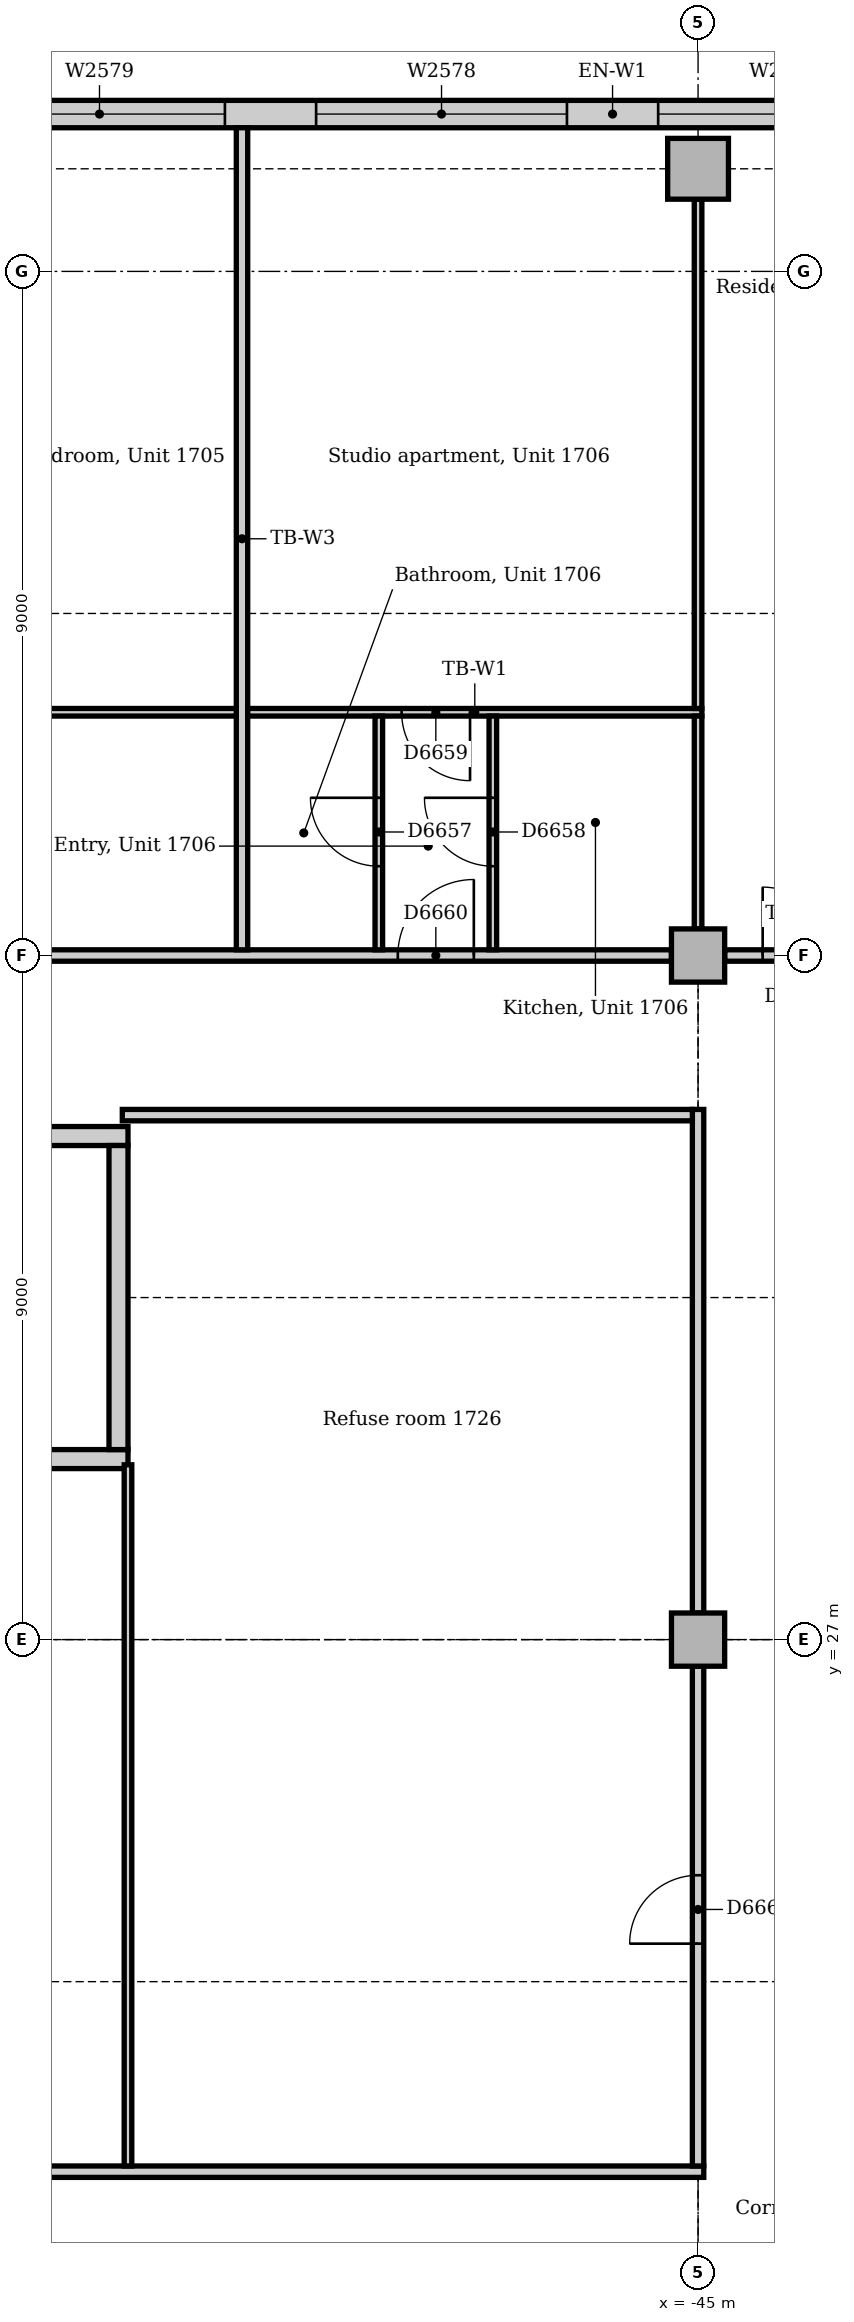
"""IFC4 building model, lengths in metres.
Left out: names, types, materials, properties, quantities, classifications, styles, units other than length and angle.
Written with IfcOpenShell. Run it as: python <this file> out.ifc"""

import sys

from ifc_helpers import new_model, si_unit, direction, frame, frame_2d, origin, origin_2d, place, context, subcontext, project, spatial, rectangle, extrude, element, fill, save


model = new_model("IFC4")
c1 = context("Model", 3, precision=1e-05, world=origin(), true_north=direction((0.0, 1.0)))
c2 = subcontext(c1, "Body", "Model", "MODEL_VIEW")
j1 = project(units=[si_unit("LENGTHUNIT", "METRE"), si_unit("PLANEANGLEUNIT", "RADIAN")], contexts=[c1])
p1 = place(None, origin())
s1 = spatial("IfcSite", under=j1, at=p1, CompositionType="ELEMENT")
p2 = place(p1, origin())
s2 = spatial("IfcBuilding", under=s1, at=p2, CompositionType="ELEMENT")
p3 = place(p2, frame((0.0, 0.0, 75.0)))
s3 = spatial("IfcBuildingStorey", under=s2, at=p3, CompositionType="ELEMENT", Elevation=75.0)
p4 = place(p3, frame((-60.0, 29.375, 0.0), z_axis=(0.0, 0.0, 1.0), x_axis=(1.0, 0.0, 0.0)))
e1 = element("IfcWall", 1, at=p4, inside=s3, PredefinedType="SOLIDWALL", context=c2, shape_type="SweptSolid", body=[
    extrude(rectangle(XDim=7.5, YDim=0.25, at=frame_2d((3.75, 0.0))), origin(), (0.0, 0.0, 1.0), 4.0),
])
p5 = place(p3, frame((-52.5, 33.625, 0.0), z_axis=(0.0, 0.0, 1.0), x_axis=(-1.0, 0.0, 0.0)))
e2 = element("IfcWall", 2, at=p5, inside=s3, PredefinedType="SOLIDWALL", context=c2, shape_type="SweptSolid", body=[
    extrude(rectangle(XDim=7.5, YDim=0.25, at=frame_2d((3.75, 0.0))), origin(), (0.0, 0.0, 1.0), 4.0),
])
p6 = place(p5, frame((6.0, 0.0, 0.0)))
e3 = element("IfcOpeningElement", 3, at=p6, cuts=e2, PredefinedType="OPENING", context=c2, shape_type="SweptSolid", body=[
    extrude(rectangle(XDim=1.0, YDim=2.1, at=frame_2d((0.5, 1.05))), frame((0.0, 0.135, 0.0), z_axis=(0.0, -1.0, 0.0), x_axis=(1.0, 0.0, 0.0)), (0.0, 0.0, 1.0), 0.27),
])
p7 = place(p3, frame((-52.625, 29.5, 0.0), z_axis=(0.0, 0.0, 1.0), x_axis=(0.0, 1.0, 0.0)))
e4 = element("IfcWall", 4, at=p7, inside=s3, PredefinedType="SOLIDWALL", context=c2, shape_type="SweptSolid", body=[
    extrude(rectangle(XDim=4.0, YDim=0.25, at=frame_2d((2.0, 0.0))), origin(), (0.0, 0.0, 1.0), 4.0),
])
p8 = place(p3, frame((-45.0, 46.35, 0.0), z_axis=(0.0, 0.0, 1.0), x_axis=(1.0, 0.0, 0.0)))
e5 = element("IfcColumn", 5, at=p8, inside=s3, PredefinedType="COLUMN", context=c2, shape_type="SweptSolid", body=[
    extrude(rectangle(XDim=0.8, YDim=0.8, at=origin_2d()), origin(), (0.0, 0.0, 1.0), 3.85),
])
for number, where, z_axis, x_axis in (
    (6, (-45.0, 27.0, 0.0), (0.0, 0.0, 1.0), (1.0, 0.0, 0.0)),
    (7, (-45.0, 36.0, 0.0), (0.0, 0.0, 1.0), (1.0, 0.0, 0.0)),
):
    element("IfcColumn", number, at=place(p3, frame(where, z_axis=z_axis, x_axis=x_axis)), inside=s3, PredefinedType="COLUMN", context=c2, shape_type="SweptSolid", body=[
        extrude(rectangle(XDim=0.7, YDim=0.7, at=origin_2d()), origin(), (0.0, 0.0, 1.0), 3.85),
    ])
p9 = place(p3, frame((-31.243, 47.07, 0.0), z_axis=(0.0, 0.0, 1.0), x_axis=(-1.0, 0.0, 0.0)))
e8 = element("IfcWall", 8, at=p9, inside=s3, PredefinedType="STANDARD", context=c2, shape_type="SweptSolid", body=[
    extrude(rectangle(XDim=29.765, YDim=0.36, at=frame_2d((14.882, 0.0))), origin(), (0.0, 0.0, 1.0), 3.85),
])
p10 = place(p9, frame((1.982, 0.0, 0.9)))
e9 = element("IfcOpeningElement", 9, at=p10, cuts=e8, PredefinedType="OPENING", context=c2, shape_type="SweptSolid", body=[
    extrude(rectangle(XDim=3.3, YDim=1.6, at=frame_2d((1.65, 0.8))), frame((0.0, 0.19, 0.0), z_axis=(0.0, -1.0, 0.0), x_axis=(1.0, 0.0, 0.0)), (0.0, 0.0, 1.0), 0.38),
])
p11 = place(p9, frame((6.482, 0.0, 0.9)))
e10 = element("IfcOpeningElement", 10, at=p11, cuts=e8, PredefinedType="OPENING", context=c2, shape_type="SweptSolid", body=[
    extrude(rectangle(XDim=3.3, YDim=1.6, at=frame_2d((1.65, 0.8))), frame((0.0, 0.19, 0.0), z_axis=(0.0, -1.0, 0.0), x_axis=(1.0, 0.0, 0.0)), (0.0, 0.0, 1.0), 0.38),
])
p12 = place(p9, frame((10.982, 0.0, 0.9)))
e11 = element("IfcOpeningElement", 11, at=p12, cuts=e8, PredefinedType="OPENING", context=c2, shape_type="SweptSolid", body=[
    extrude(rectangle(XDim=3.3, YDim=1.6, at=frame_2d((1.65, 0.8))), frame((0.0, 0.19, 0.0), z_axis=(0.0, -1.0, 0.0), x_axis=(1.0, 0.0, 0.0)), (0.0, 0.0, 1.0), 0.38),
])
p13 = place(p9, frame((15.482, 0.0, 0.9)))
e12 = element("IfcOpeningElement", 12, at=p13, cuts=e8, PredefinedType="OPENING", context=c2, shape_type="SweptSolid", body=[
    extrude(rectangle(XDim=3.3, YDim=1.6, at=frame_2d((1.65, 0.8))), frame((0.0, 0.19, 0.0), z_axis=(0.0, -1.0, 0.0), x_axis=(1.0, 0.0, 0.0)), (0.0, 0.0, 1.0), 0.38),
])
p14 = place(p9, frame((19.982, 0.0, 0.9)))
e13 = element("IfcOpeningElement", 13, at=p14, cuts=e8, PredefinedType="OPENING", context=c2, shape_type="SweptSolid", body=[
    extrude(rectangle(XDim=3.3, YDim=1.6, at=frame_2d((1.65, 0.8))), frame((0.0, 0.19, 0.0), z_axis=(0.0, -1.0, 0.0), x_axis=(1.0, 0.0, 0.0)), (0.0, 0.0, 1.0), 0.38),
])
p15 = place(p9, frame((24.482, 0.0, 0.9)))
e14 = element("IfcOpeningElement", 14, at=p15, cuts=e8, PredefinedType="OPENING", context=c2, shape_type="SweptSolid", body=[
    extrude(rectangle(XDim=3.3, YDim=1.6, at=frame_2d((1.65, 0.8))), frame((0.0, 0.19, 0.0), z_axis=(0.0, -1.0, 0.0), x_axis=(1.0, 0.0, 0.0)), (0.0, 0.0, 1.0), 0.38),
])
p16 = place(p3, frame((-44.65, 36.0, 0.0), z_axis=(0.0, 0.0, 1.0), x_axis=(1.0, 0.0, 0.0)))
e15 = element("IfcWall", 15, at=p16, inside=s3, PredefinedType="PARTITIONING", context=c2, shape_type="SweptSolid", body=[
    extrude(rectangle(XDim=1.925, YDim=0.15, at=frame_2d((0.963, 0.0))), origin(), (0.0, 0.0, 1.0), 3.602),
])
p17 = place(p16, frame((0.5, 0.0, 0.0)))
e16 = element("IfcOpeningElement", 16, at=p17, cuts=e15, PredefinedType="OPENING", context=c2, shape_type="SweptSolid", body=[
    extrude(rectangle(XDim=0.9, YDim=2.1, at=frame_2d((0.45, 1.05))), frame((0.0, 0.085, 0.0), z_axis=(0.0, -1.0, 0.0), x_axis=(1.0, 0.0, 0.0)), (0.0, 0.0, 1.0), 0.17),
])
p18 = place(p3, frame((-53.65, 36.0, 0.0), z_axis=(0.0, 0.0, 1.0), x_axis=(1.0, 0.0, 0.0)))
e17 = element("IfcWall", 17, at=p18, inside=s3, PredefinedType="PARTITIONING", context=c2, shape_type="SweptSolid", body=[
    extrude(rectangle(XDim=8.3, YDim=0.15, at=frame_2d((4.15, 0.0))), origin(), (0.0, 0.0, 1.0), 3.158),
])
p19 = place(p18, frame((4.7, 0.0, 0.0)))
e18 = element("IfcOpeningElement", 18, at=p19, cuts=e17, PredefinedType="OPENING", context=c2, shape_type="SweptSolid", body=[
    extrude(rectangle(XDim=1.0, YDim=2.1, at=frame_2d((0.5, 1.05))), frame((0.0, 0.085, 0.0), z_axis=(0.0, -1.0, 0.0), x_axis=(1.0, 0.0, 0.0)), (0.0, 0.0, 1.0), 0.17),
])
p20 = place(p3, frame((-64.89, 20.0, 0.0), z_axis=(0.0, 0.0, 1.0), x_axis=(1.0, 0.0, 0.0)))
e19 = element("IfcWall", 19, at=p20, inside=s3, PredefinedType="PARTITIONING", context=c2, shape_type="SweptSolid", body=[
    extrude(rectangle(XDim=19.965, YDim=0.15, at=frame_2d((9.982, 0.0))), origin(), (0.0, 0.0, 1.0), 3.85),
])
p21 = place(p20, frame((2.05, 0.0, 0.0)))
e20 = element("IfcOpeningElement", 20, at=p21, cuts=e19, PredefinedType="OPENING", context=c2, shape_type="SweptSolid", body=[
    extrude(rectangle(XDim=0.9, YDim=2.1, at=frame_2d((0.45, 1.05))), frame((0.0, 0.085, 0.0), z_axis=(0.0, -1.0, 0.0), x_axis=(1.0, 0.0, 0.0)), (0.0, 0.0, 1.0), 0.17),
])
p22 = place(p20, frame((8.19, 0.0, 0.0)))
e21 = element("IfcOpeningElement", 21, at=p22, cuts=e19, PredefinedType="OPENING", context=c2, shape_type="SweptSolid", body=[
    extrude(rectangle(XDim=0.9, YDim=2.1, at=frame_2d((0.45, 1.05))), frame((0.0, 0.085, 0.0), z_axis=(0.0, -1.0, 0.0), x_axis=(1.0, 0.0, 0.0)), (0.0, 0.0, 1.0), 0.17),
])
p23 = place(p3, frame((-45.0, 20.075, 0.0), z_axis=(0.0, 0.0, 1.0), x_axis=(0.0, 1.0, 0.0)))
e22 = element("IfcWall", 22, at=p23, inside=s3, PredefinedType="PARTITIONING", context=c2, shape_type="SweptSolid", body=[
    extrude(rectangle(XDim=6.575, YDim=0.15, at=frame_2d((3.288, 0.0))), origin(), (0.0, 0.0, 1.0), 3.256),
])
p24 = place(p23, frame((2.925, 0.0, 0.0)))
e23 = element("IfcOpeningElement", 23, at=p24, cuts=e22, PredefinedType="OPENING", context=c2, shape_type="SweptSolid", body=[
    extrude(rectangle(XDim=0.9, YDim=2.1, at=frame_2d((0.45, 1.05))), frame((0.0, 0.085, 0.0), z_axis=(0.0, -1.0, 0.0), x_axis=(1.0, 0.0, 0.0)), (0.0, 0.0, 1.0), 0.17),
])
p25 = place(p3, frame((-45.0, 27.35, 0.0), z_axis=(0.0, 0.0, 1.0), x_axis=(0.0, 1.0, 0.0)))
e24 = element("IfcWall", 24, at=p25, inside=s3, PredefinedType="PARTITIONING", context=c2, shape_type="SweptSolid", body=[
    extrude(rectangle(XDim=6.625, YDim=0.15, at=frame_2d((3.312, 0.0))), origin(), (0.0, 0.0, 1.0), 3.256),
])
p26 = place(p3, frame((-52.575, 33.9, 0.0), z_axis=(0.0, 0.0, 1.0), x_axis=(1.0, 0.0, 0.0)))
e25 = element("IfcWall", 25, at=p26, inside=s3, PredefinedType="PARTITIONING", context=c2, shape_type="SweptSolid", body=[
    extrude(rectangle(XDim=7.5, YDim=0.15, at=frame_2d((3.75, 0.0))), origin(), (0.0, 0.0, 1.0), 3.85),
])
p27 = place(p3, frame((-51.0, 36.075, 0.0), z_axis=(0.0, 0.0, 1.0), x_axis=(0.0, 1.0, 0.0)))
e26 = element("IfcWall", 26, at=p27, inside=s3, PredefinedType="PARTITIONING", context=c2, shape_type="SweptSolid", body=[
    extrude(rectangle(XDim=10.815, YDim=0.15, at=frame_2d((5.407, 0.0))), origin(), (0.0, 0.0, 1.0), 3.85),
])
p28 = place(p3, frame((-50.925, 39.2, 0.0), z_axis=(0.0, 0.0, 1.0), x_axis=(1.0, 0.0, 0.0)))
e27 = element("IfcWall", 27, at=p28, inside=s3, PredefinedType="PARTITIONING", context=c2, shape_type="SweptSolid", body=[
    extrude(rectangle(XDim=5.975, YDim=0.1, at=frame_2d((2.987, 0.0))), origin(), (0.0, 0.0, 1.0), 3.85),
])
p29 = place(p28, frame((2.025, 0.0, 0.0)))
e28 = element("IfcOpeningElement", 28, at=p29, cuts=e27, PredefinedType="OPENING", context=c2, shape_type="SweptSolid", body=[
    extrude(rectangle(XDim=0.9, YDim=2.1, at=frame_2d((0.45, 1.05))), frame((0.0, 0.06, 0.0), z_axis=(0.0, -1.0, 0.0), x_axis=(1.0, 0.0, 0.0)), (0.0, 0.0, 1.0), 0.12),
])
p30 = place(p3, frame((-64.89, 39.2, 0.0), z_axis=(0.0, 0.0, 1.0), x_axis=(1.0, 0.0, 0.0)))
e29 = element("IfcWall", 29, at=p30, inside=s3, PredefinedType="PARTITIONING", context=c2, shape_type="SweptSolid", body=[
    extrude(rectangle(XDim=13.815, YDim=0.1, at=frame_2d((6.907, 0.0))), origin(), (0.0, 0.0, 1.0), 3.85),
])
p31 = place(p30, frame((5.406, 0.0, 0.0)))
e30 = element("IfcOpeningElement", 30, at=p31, cuts=e29, PredefinedType="OPENING", context=c2, shape_type="SweptSolid", body=[
    extrude(rectangle(XDim=0.9, YDim=2.1, at=frame_2d((0.45, 1.05))), frame((0.0, 0.06, 0.0), z_axis=(0.0, -1.0, 0.0), x_axis=(1.0, 0.0, 0.0)), (0.0, 0.0, 1.0), 0.12),
])
p32 = place(p3, frame((-45.0, 39.25, 0.0), z_axis=(0.0, 0.0, 1.0), x_axis=(0.0, 1.0, 0.0)))
e31 = element("IfcWall", 31, at=p32, inside=s3, PredefinedType="PARTITIONING", context=c2, shape_type="SweptSolid", body=[
    extrude(rectangle(XDim=6.7, YDim=0.1, at=frame_2d((3.35, 0.0))), origin(), (0.0, 0.0, 1.0), 3.256),
])
p33 = place(p3, frame((-45.0, 36.35, 0.0), z_axis=(0.0, 0.0, 1.0), x_axis=(0.0, 1.0, 0.0)))
e32 = element("IfcWall", 32, at=p33, inside=s3, PredefinedType="PARTITIONING", context=c2, shape_type="SweptSolid", body=[
    extrude(rectangle(XDim=2.8, YDim=0.1, at=frame_2d((1.4, 0.0))), origin(), (0.0, 0.0, 1.0), 3.256),
])
p34 = place(p3, frame((-52.5, 20.075, 0.0), z_axis=(0.0, 0.0, 1.0), x_axis=(0.0, 1.0, 0.0)))
e33 = element("IfcWall", 33, at=p34, inside=s3, PredefinedType="PARTITIONING", context=c2, shape_type="SweptSolid", body=[
    extrude(rectangle(XDim=9.225, YDim=0.1, at=frame_2d((4.612, 0.0))), origin(), (0.0, 0.0, 1.0), 3.85),
])
p35 = place(p3, frame((-49.2, 36.075, 0.0), z_axis=(0.0, 0.0, 1.0), x_axis=(0.0, 1.0, 0.0)))
e34 = element("IfcWall", 34, at=p35, inside=s3, PredefinedType="PARTITIONING", context=c2, shape_type="SweptSolid", body=[
    extrude(rectangle(XDim=3.075, YDim=0.1, at=frame_2d((1.538, 0.0))), origin(), (0.0, 0.0, 1.0), 3.85),
])
p36 = place(p35, frame((1.1, 0.0, 0.0)))
e35 = element("IfcOpeningElement", 35, at=p36, cuts=e34, PredefinedType="OPENING", context=c2, shape_type="SweptSolid", body=[
    extrude(rectangle(XDim=0.9, YDim=2.1, at=frame_2d((0.45, 1.05))), frame((0.0, 0.06, 0.0), z_axis=(0.0, -1.0, 0.0), x_axis=(1.0, 0.0, 0.0)), (0.0, 0.0, 1.0), 0.12),
])
p37 = place(p3, frame((-47.7, 36.075, 0.0), z_axis=(0.0, 0.0, 1.0), x_axis=(0.0, 1.0, 0.0)))
e36 = element("IfcWall", 36, at=p37, inside=s3, PredefinedType="PARTITIONING", context=c2, shape_type="SweptSolid", body=[
    extrude(rectangle(XDim=3.075, YDim=0.1, at=frame_2d((1.538, 0.0))), origin(), (0.0, 0.0, 1.0), 3.85),
])
p38 = place(p37, frame((1.1, 0.0, 0.0)))
e37 = element("IfcOpeningElement", 37, at=p38, cuts=e36, PredefinedType="OPENING", context=c2, shape_type="SweptSolid", body=[
    extrude(rectangle(XDim=0.9, YDim=2.1, at=frame_2d((0.45, 1.05))), frame((0.0, 0.06, 0.0), z_axis=(0.0, -1.0, 0.0), x_axis=(1.0, 0.0, 0.0)), (0.0, 0.0, 1.0), 0.12),
])
p39 = place(p12, origin())
e38 = element("IfcWindow", 38, at=p39, inside=s3, PartitioningType="SINGLE_PANEL", PredefinedType="WINDOW", context=c2, shape_type="SweptSolid", body=[
    extrude(rectangle(XDim=3.3, YDim=1.6, at=frame_2d((1.65, 0.8))), frame((0.0, 0.13, 0.0), z_axis=(0.0, -1.0, 0.0), x_axis=(1.0, 0.0, 0.0)), (0.0, 0.0, 1.0), 0.06),
])
fill(e11, e38)
p40 = place(p13, origin())
e39 = element("IfcWindow", 39, at=p40, inside=s3, PartitioningType="SINGLE_PANEL", PredefinedType="WINDOW", context=c2, shape_type="SweptSolid", body=[
    extrude(rectangle(XDim=3.3, YDim=1.6, at=frame_2d((1.65, 0.8))), frame((0.0, 0.13, 0.0), z_axis=(0.0, -1.0, 0.0), x_axis=(1.0, 0.0, 0.0)), (0.0, 0.0, 1.0), 0.06),
])
fill(e12, e39)
p41 = place(p14, origin())
e40 = element("IfcWindow", 40, at=p41, inside=s3, PartitioningType="SINGLE_PANEL", PredefinedType="WINDOW", context=c2, shape_type="SweptSolid", body=[
    extrude(rectangle(XDim=3.3, YDim=1.6, at=frame_2d((1.65, 0.8))), frame((0.0, 0.13, 0.0), z_axis=(0.0, -1.0, 0.0), x_axis=(1.0, 0.0, 0.0)), (0.0, 0.0, 1.0), 0.06),
])
fill(e13, e40)
p42 = place(p17, origin())
e41 = element("IfcDoor", 41, at=p42, inside=s3, OperationType="SINGLE_SWING_LEFT", PredefinedType="DOOR", context=c2, shape_type="SweptSolid", body=[
    extrude(rectangle(XDim=0.9, YDim=2.1, at=frame_2d((0.45, 1.05))), frame((0.0, 0.025, 0.0), z_axis=(0.0, -1.0, 0.0), x_axis=(1.0, 0.0, 0.0)), (0.0, 0.0, 1.0), 0.05),
])
fill(e16, e41)
p43 = place(p36, origin())
e42 = element("IfcDoor", 42, at=p43, inside=s3, OperationType="SINGLE_SWING_RIGHT", PredefinedType="DOOR", context=c2, shape_type="SweptSolid", body=[
    extrude(rectangle(XDim=0.9, YDim=2.1, at=frame_2d((0.45, 1.05))), frame((0.0, 0.025, 0.0), z_axis=(0.0, -1.0, 0.0), x_axis=(1.0, 0.0, 0.0)), (0.0, 0.0, 1.0), 0.05),
])
fill(e35, e42)
p44 = place(p38, origin())
e43 = element("IfcDoor", 43, at=p44, inside=s3, OperationType="SINGLE_SWING_RIGHT", PredefinedType="DOOR", context=c2, shape_type="SweptSolid", body=[
    extrude(rectangle(XDim=0.9, YDim=2.1, at=frame_2d((0.45, 1.05))), frame((0.0, 0.025, 0.0), z_axis=(0.0, -1.0, 0.0), x_axis=(1.0, 0.0, 0.0)), (0.0, 0.0, 1.0), 0.05),
])
fill(e37, e43)
p45 = place(p29, frame((0.9, 0.0, 0.0), z_axis=(0.0, 0.0, 1.0), x_axis=(-1.0, 0.0, 0.0)))
e44 = element("IfcDoor", 44, at=p45, inside=s3, OperationType="SINGLE_SWING_LEFT", PredefinedType="DOOR", context=c2, shape_type="SweptSolid", body=[
    extrude(rectangle(XDim=0.9, YDim=2.1, at=frame_2d((0.45, 1.05))), frame((0.0, 0.025, 0.0), z_axis=(0.0, -1.0, 0.0), x_axis=(1.0, 0.0, 0.0)), (0.0, 0.0, 1.0), 0.05),
])
fill(e28, e44)
p46 = place(p19, origin())
e45 = element("IfcDoor", 45, at=p46, inside=s3, OperationType="SINGLE_SWING_RIGHT", PredefinedType="DOOR", context=c2, shape_type="SweptSolid", body=[
    extrude(rectangle(XDim=1.0, YDim=2.1, at=frame_2d((0.5, 1.05))), frame((0.0, 0.025, 0.0), z_axis=(0.0, -1.0, 0.0), x_axis=(1.0, 0.0, 0.0)), (0.0, 0.0, 1.0), 0.05),
])
fill(e18, e45)
p47 = place(p24, origin())
e46 = element("IfcDoor", 46, at=p47, inside=s3, OperationType="SINGLE_SWING_LEFT", PredefinedType="DOOR", context=c2, shape_type="SweptSolid", body=[
    extrude(rectangle(XDim=0.9, YDim=2.1, at=frame_2d((0.45, 1.05))), frame((0.0, 0.025, 0.0), z_axis=(0.0, -1.0, 0.0), x_axis=(1.0, 0.0, 0.0)), (0.0, 0.0, 1.0), 0.05),
])
fill(e23, e46)
save(model, sys.argv[1])
